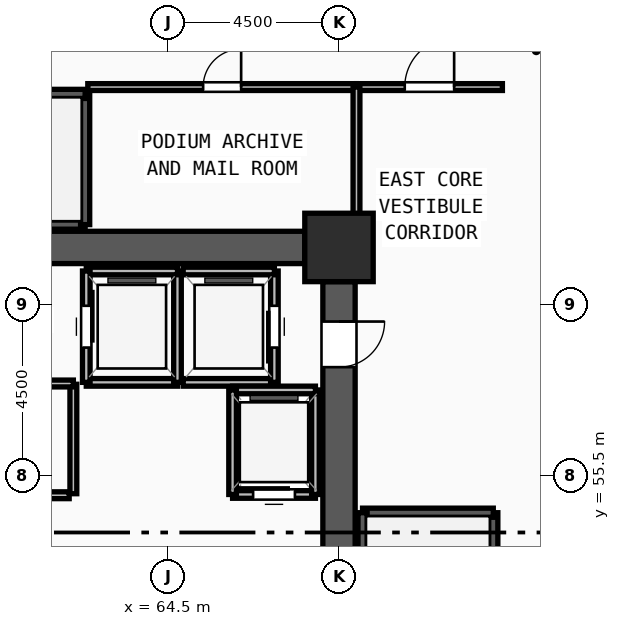
"""IFC4 building model, lengths in metres.
Left out: names, types, materials, properties, quantities, classifications, styles, units other than length and angle.
Written with IfcOpenShell. Run it as: python <this file> out.ifc"""

import sys

from ifc_helpers import new_model, si_unit, direction, frame, frame_2d, origin, origin_2d, place, context, subcontext, project, spatial, rectangle, extrude, source, transform, mapped, element, fill, save


model = new_model("IFC4")
c1 = context("Model", 3, precision=1e-05, world=origin(), true_north=direction((0.0, 1.0)))
c2 = subcontext(c1, "Body", "Model", "MODEL_VIEW")
j1 = project(units=[si_unit("LENGTHUNIT", "METRE"), si_unit("PLANEANGLEUNIT", "RADIAN")], contexts=[c1])
p1 = place(None, origin())
s1 = spatial("IfcSite", under=j1, at=p1, CompositionType="ELEMENT")
p2 = place(p1, origin())
s2 = spatial("IfcBuilding", under=s1, at=p2, CompositionType="ELEMENT")
p3 = place(p2, origin())
s3 = spatial("IfcBuildingStorey", under=s2, at=p3, CompositionType="ELEMENT", Elevation=0.0)
m1 = source(origin(), c2, "Body", "SweptSolid", [
    extrude(rectangle(XDim=1.8, YDim=1.8, at=origin_2d()), origin(), (0.0, 0.0, 1.0), 5.4),
])
p4 = place(p3, frame((69.0, 61.5, 0.0), z_axis=(0.0, 0.0, 1.0), x_axis=(1.0, 0.0, 0.0)))
e1 = element("IfcColumn", 1, at=p4, inside=s3, PredefinedType="COLUMN", context=c2, shape_type="MappedRepresentation", body=[
    mapped(m1, transform((0.0, 0.0, 0.0), x_axis=(1.0, 0.0, 0.0), y_axis=(0.0, 1.0, 0.0), z_axis=(0.0, 0.0, 1.0), scale=1.0)),
])
p5 = place(p3, frame((60.9, 61.5, 0.0), z_axis=(0.0, 0.0, 1.0), x_axis=(1.0, 0.0, 0.0)))
e2 = element("IfcWall", 2, at=p5, inside=s3, PredefinedType="SHEAR", context=c2, shape_type="SweptSolid", body=[
    extrude(rectangle(XDim=7.2, YDim=0.85, at=frame_2d((3.6, 0.0))), origin(), (0.0, 0.0, 1.0), 5.15),
])
p6 = place(p3, frame((69.0, 60.6, 0.0), z_axis=(0.0, 0.0, 1.0), x_axis=(0.0, -1.0, 0.0)))
e3 = element("IfcWall", 3, at=p6, inside=s3, PredefinedType="SHEAR", context=c2, shape_type="SweptSolid", body=[
    extrude(rectangle(XDim=13.2, YDim=0.85, at=frame_2d((6.6, 0.0))), origin(), (0.0, 0.0, 1.0), 5.15),
])
m2 = source(origin(), c2, "Body", "SweptSolid", [
    extrude(rectangle(XDim=1.2, YDim=2.2, at=frame_2d((0.6, 1.1))), frame((0.0, 0.435, 0.0), z_axis=(0.0, -1.0, 0.0), x_axis=(1.0, 0.0, 0.0)), (0.0, 0.0, 1.0), 0.87),
])
p7 = place(p6, frame((1.05, 0.0, 0.0)))
e4 = element("IfcOpeningElement", 4, at=p7, cuts=e3, PredefinedType="OPENING", context=c2, shape_type="MappedRepresentation", body=[
    mapped(m2, transform((0.0, 0.0, 0.0), x_axis=(1.0, 0.0, 0.0), y_axis=(0.0, 1.0, 0.0), z_axis=(0.0, 0.0, 1.0), scale=1.0)),
])
p8 = place(p3, frame((73.06, 46.7, 0.0), z_axis=(0.0, 0.0, 1.0), x_axis=(0.0, 1.0, 0.0)))
e5 = element("IfcWall", 5, at=p8, inside=s3, PredefinedType="SOLIDWALL", context=c2, shape_type="SweptSolid", body=[
    extrude(rectangle(XDim=7.82, YDim=0.24, at=frame_2d((3.91, 0.0))), origin(), (0.0, 0.0, 1.0), 5.15),
])
m3 = source(origin(), c2, "Body", "SweptSolid", [
    extrude(rectangle(XDim=1.2, YDim=2.2, at=frame_2d((0.6, 1.1))), frame((0.0, 0.13, 0.0), z_axis=(0.0, -1.0, 0.0), x_axis=(1.0, 0.0, 0.0)), (0.0, 0.0, 1.0), 0.26),
])
p9 = place(p8, frame((0.32, 0.0, 0.0)))
e6 = element("IfcOpeningElement", 6, at=p9, cuts=e5, PredefinedType="OPENING", context=c2, shape_type="MappedRepresentation", body=[
    mapped(m3, transform((0.0, 0.0, 0.0), x_axis=(1.0, 0.0, 0.0), y_axis=(0.0, 1.0, 0.0), z_axis=(0.0, 0.0, 1.0), scale=1.0)),
])
p10 = place(p3, frame((73.06, 54.52, 0.0), z_axis=(0.0, 0.0, 1.0), x_axis=(-1.0, 0.0, 0.0)))
e7 = element("IfcWall", 7, at=p10, inside=s3, PredefinedType="SOLIDWALL", context=c2, shape_type="SweptSolid", body=[
    extrude(rectangle(XDim=3.44, YDim=0.24, at=frame_2d((1.72, 0.0))), origin(), (0.0, 0.0, 1.0), 5.15),
])
for number, where, z_axis, x_axis in (
    (8, (69.62, 54.52, 0.0), (0.0, 0.0, 1.0), (0.0, -1.0, 0.0)),
    (9, (54.5, 62.1, 0.0), (0.0, 0.0, 1.0), (1.0, 0.0, 0.0)),
):
    element("IfcWall", number, at=place(p3, frame(where, z_axis=z_axis, x_axis=x_axis)), inside=s3, PredefinedType="SOLIDWALL", context=c2, shape_type="SweptSolid", body=[
        extrude(rectangle(XDim=7.82, YDim=0.24, at=frame_2d((3.91, 0.0))), origin(), (0.0, 0.0, 1.0), 5.15),
    ])
p11 = place(p3, frame((62.32, 62.1, 0.0), z_axis=(0.0, 0.0, 1.0), x_axis=(0.0, 1.0, 0.0)))
e10 = element("IfcWall", 10, at=p11, inside=s3, PredefinedType="SOLIDWALL", context=c2, shape_type="SweptSolid", body=[
    extrude(rectangle(XDim=3.44, YDim=0.24, at=frame_2d((1.72, 0.0))), origin(), (0.0, 0.0, 1.0), 5.15),
])
p12 = place(p3, frame((62.32, 65.54, 0.0), z_axis=(0.0, 0.0, 1.0), x_axis=(-1.0, 0.0, 0.0)))
e11 = element("IfcWall", 11, at=p12, inside=s3, PredefinedType="SOLIDWALL", context=c2, shape_type="SweptSolid", body=[
    extrude(rectangle(XDim=7.82, YDim=0.24, at=frame_2d((3.91, 0.0))), origin(), (0.0, 0.0, 1.0), 5.15),
])
p13 = place(p12, frame((6.3, 0.0, 0.0)))
e12 = element("IfcOpeningElement", 12, at=p13, cuts=e11, PredefinedType="OPENING", context=c2, shape_type="MappedRepresentation", body=[
    mapped(m3, transform((0.0, 0.0, 0.0), x_axis=(1.0, 0.0, 0.0), y_axis=(0.0, 1.0, 0.0), z_axis=(0.0, 0.0, 1.0), scale=1.0)),
])
p14 = place(p3, frame((62.35, 57.95, 0.0), z_axis=(0.0, 0.0, 1.0), x_axis=(1.0, 0.0, 0.0)))
e13 = element("IfcWall", 13, at=p14, inside=s3, PredefinedType="SOLIDWALL", context=c2, shape_type="SweptSolid", body=[
    extrude(rectangle(XDim=2.4, YDim=0.2, at=frame_2d((1.2, 0.0))), origin(), (0.0, 0.0, 1.0), 5.15),
])
p15 = place(p3, frame((64.75, 57.95, 0.0), z_axis=(0.0, 0.0, 1.0), x_axis=(0.0, 1.0, 0.0)))
e14 = element("IfcWall", 14, at=p15, inside=s3, PredefinedType="SOLIDWALL", context=c2, shape_type="SweptSolid", body=[
    extrude(rectangle(XDim=2.93, YDim=0.2, at=frame_2d((1.465, 0.0))), origin(), (0.0, 0.0, 1.0), 5.15),
])
p16 = place(p3, frame((64.75, 60.88, 0.0), z_axis=(0.0, 0.0, 1.0), x_axis=(-1.0, 0.0, 0.0)))
e15 = element("IfcWall", 15, at=p16, inside=s3, PredefinedType="SOLIDWALL", context=c2, shape_type="SweptSolid", body=[
    extrude(rectangle(XDim=2.4, YDim=0.2, at=frame_2d((1.2, 0.0))), origin(), (0.0, 0.0, 1.0), 5.15),
])
p17 = place(p3, frame((62.35, 60.88, 0.0), z_axis=(0.0, 0.0, 1.0), x_axis=(0.0, -1.0, 0.0)))
e16 = element("IfcWall", 16, at=p17, inside=s3, PredefinedType="SOLIDWALL", context=c2, shape_type="SweptSolid", body=[
    extrude(rectangle(XDim=2.93, YDim=0.2, at=frame_2d((1.465, 0.0))), origin(), (0.0, 0.0, 1.0), 5.15),
])
m4 = source(origin(), c2, "Body", "SweptSolid", [
    extrude(rectangle(XDim=1.1, YDim=2.2, at=frame_2d((0.55, 1.1))), frame((0.0, 0.11, 0.0), z_axis=(0.0, -1.0, 0.0), x_axis=(1.0, 0.0, 0.0)), (0.0, 0.0, 1.0), 0.22),
])
p18 = place(p17, frame((0.915, 0.0, 0.0)))
e17 = element("IfcOpeningElement", 17, at=p18, cuts=e16, PredefinedType="OPENING", context=c2, shape_type="MappedRepresentation", body=[
    mapped(m4, transform((0.0, 0.0, 0.0), x_axis=(1.0, 0.0, 0.0), y_axis=(0.0, 1.0, 0.0), z_axis=(0.0, 0.0, 1.0), scale=1.0)),
])
p19 = place(p3, frame((64.9, 57.95, 0.0), z_axis=(0.0, 0.0, 1.0), x_axis=(1.0, 0.0, 0.0)))
e18 = element("IfcWall", 18, at=p19, inside=s3, PredefinedType="SOLIDWALL", context=c2, shape_type="SweptSolid", body=[
    extrude(rectangle(XDim=2.4, YDim=0.2, at=frame_2d((1.2, 0.0))), origin(), (0.0, 0.0, 1.0), 5.15),
])
p20 = place(p3, frame((67.3, 57.95, 0.0), z_axis=(0.0, 0.0, 1.0), x_axis=(0.0, 1.0, 0.0)))
e19 = element("IfcWall", 19, at=p20, inside=s3, PredefinedType="SOLIDWALL", context=c2, shape_type="SweptSolid", body=[
    extrude(rectangle(XDim=2.93, YDim=0.2, at=frame_2d((1.465, 0.0))), origin(), (0.0, 0.0, 1.0), 5.15),
])
p21 = place(p20, frame((0.915, 0.0, 0.0)))
e20 = element("IfcOpeningElement", 20, at=p21, cuts=e19, PredefinedType="OPENING", context=c2, shape_type="MappedRepresentation", body=[
    mapped(m4, transform((0.0, 0.0, 0.0), x_axis=(1.0, 0.0, 0.0), y_axis=(0.0, 1.0, 0.0), z_axis=(0.0, 0.0, 1.0), scale=1.0)),
])
p22 = place(p3, frame((67.3, 60.88, 0.0), z_axis=(0.0, 0.0, 1.0), x_axis=(-1.0, 0.0, 0.0)))
e21 = element("IfcWall", 21, at=p22, inside=s3, PredefinedType="SOLIDWALL", context=c2, shape_type="SweptSolid", body=[
    extrude(rectangle(XDim=2.4, YDim=0.2, at=frame_2d((1.2, 0.0))), origin(), (0.0, 0.0, 1.0), 5.15),
])
p23 = place(p3, frame((66.2, 55.0, 0.0), z_axis=(0.0, 0.0, 1.0), x_axis=(1.0, 0.0, 0.0)))
e22 = element("IfcWall", 22, at=p23, inside=s3, PredefinedType="SOLIDWALL", context=c2, shape_type="SweptSolid", body=[
    extrude(rectangle(XDim=2.18, YDim=0.2, at=frame_2d((1.09, 0.0))), origin(), (0.0, 0.0, 1.0), 5.15),
])
p24 = place(p23, frame((0.54, 0.0, 0.0)))
e23 = element("IfcOpeningElement", 23, at=p24, cuts=e22, PredefinedType="OPENING", context=c2, shape_type="MappedRepresentation", body=[
    mapped(m4, transform((0.0, 0.0, 0.0), x_axis=(1.0, 0.0, 0.0), y_axis=(0.0, 1.0, 0.0), z_axis=(0.0, 0.0, 1.0), scale=1.0)),
])
p25 = place(p3, frame((68.38, 55.0, 0.0), z_axis=(0.0, 0.0, 1.0), x_axis=(0.0, 1.0, 0.0)))
e24 = element("IfcWall", 24, at=p25, inside=s3, PredefinedType="SOLIDWALL", context=c2, shape_type="SweptSolid", body=[
    extrude(rectangle(XDim=2.75, YDim=0.2, at=frame_2d((1.375, 0.0))), origin(), (0.0, 0.0, 1.0), 5.15),
])
p26 = place(p3, frame((68.38, 57.75, 0.0), z_axis=(0.0, 0.0, 1.0), x_axis=(-1.0, 0.0, 0.0)))
e25 = element("IfcWall", 25, at=p26, inside=s3, PredefinedType="SOLIDWALL", context=c2, shape_type="SweptSolid", body=[
    extrude(rectangle(XDim=2.18, YDim=0.2, at=frame_2d((1.09, 0.0))), origin(), (0.0, 0.0, 1.0), 5.15),
])
p27 = place(p3, frame((66.2, 57.75, 0.0), z_axis=(0.0, 0.0, 1.0), x_axis=(0.0, -1.0, 0.0)))
e26 = element("IfcWall", 26, at=p27, inside=s3, PredefinedType="SOLIDWALL", context=c2, shape_type="SweptSolid", body=[
    extrude(rectangle(XDim=2.75, YDim=0.2, at=frame_2d((1.375, 0.0))), origin(), (0.0, 0.0, 1.0), 5.15),
])
p28 = place(p3, frame((59.84, 54.98, 0.0), z_axis=(0.0, 0.0, 1.0), x_axis=(1.0, 0.0, 0.0)))
e27 = element("IfcWall", 27, at=p28, inside=s3, PredefinedType="PARTITIONING", context=c2, shape_type="SweptSolid", body=[
    extrude(rectangle(XDim=2.06, YDim=0.18, at=frame_2d((1.03, 0.0))), origin(), (0.0, 0.0, 1.0), 5.15),
])
m5 = source(origin(), c2, "Body", "SweptSolid", [
    extrude(rectangle(XDim=0.85, YDim=2.1, at=frame_2d((0.425, 1.05))), frame((0.0, 0.1, 0.0), z_axis=(0.0, -1.0, 0.0), x_axis=(1.0, 0.0, 0.0)), (0.0, 0.0, 1.0), 0.2),
])
p29 = place(p28, frame((0.605, 0.0, 0.0)))
e28 = element("IfcOpeningElement", 28, at=p29, cuts=e27, PredefinedType="OPENING", context=c2, shape_type="MappedRepresentation", body=[
    mapped(m5, transform((0.0, 0.0, 0.0), x_axis=(1.0, 0.0, 0.0), y_axis=(0.0, 1.0, 0.0), z_axis=(0.0, 0.0, 1.0), scale=1.0)),
])
p30 = place(p3, frame((62.39, 65.72, 0.0), z_axis=(0.0, 0.0, 1.0), x_axis=(1.0, 0.0, 0.0)))
e29 = element("IfcWall", 29, at=p30, inside=s3, PredefinedType="PARTITIONING", context=c2, shape_type="SweptSolid", body=[
    extrude(rectangle(XDim=7.07, YDim=0.18, at=frame_2d((3.535, 0.0))), origin(), (0.0, 0.0, 1.0), 5.15),
])
m6 = source(origin(), c2, "Body", "SweptSolid", [
    extrude(rectangle(XDim=1.0, YDim=2.2, at=frame_2d((0.5, 1.1))), frame((0.0, 0.1, 0.0), z_axis=(0.0, -1.0, 0.0), x_axis=(1.0, 0.0, 0.0)), (0.0, 0.0, 1.0), 0.2),
])
p31 = place(p30, frame((3.035, 0.0, 0.0)))
e30 = element("IfcOpeningElement", 30, at=p31, cuts=e29, PredefinedType="OPENING", context=c2, shape_type="MappedRepresentation", body=[
    mapped(m6, transform((0.0, 0.0, 0.0), x_axis=(1.0, 0.0, 0.0), y_axis=(0.0, 1.0, 0.0), z_axis=(0.0, 0.0, 1.0), scale=1.0)),
])
p32 = place(p3, frame((69.46, 65.72, 0.0), z_axis=(0.0, 0.0, 1.0), x_axis=(1.0, 0.0, 0.0)))
e31 = element("IfcWall", 31, at=p32, inside=s3, PredefinedType="PARTITIONING", context=c2, shape_type="SweptSolid", body=[
    extrude(rectangle(XDim=3.84, YDim=0.18, at=frame_2d((1.92, 0.0))), origin(), (0.0, 0.0, 1.0), 5.15),
])
m7 = source(origin(), c2, "Body", "SweptSolid", [
    extrude(rectangle(XDim=1.3, YDim=2.2, at=frame_2d((0.65, 1.1))), frame((0.0, 0.1, 0.0), z_axis=(0.0, -1.0, 0.0), x_axis=(1.0, 0.0, 0.0)), (0.0, 0.0, 1.0), 0.2),
])
p33 = place(p32, frame((1.27, 0.0, 0.0)))
e32 = element("IfcOpeningElement", 32, at=p33, cuts=e31, PredefinedType="OPENING", context=c2, shape_type="MappedRepresentation", body=[
    mapped(m7, transform((0.0, 0.0, 0.0), x_axis=(1.0, 0.0, 0.0), y_axis=(0.0, 1.0, 0.0), z_axis=(0.0, 0.0, 1.0), scale=1.0)),
])
p34 = place(p3, frame((62.01, 55.02, 0.0), z_axis=(0.0, 0.0, 1.0), x_axis=(0.0, 1.0, 0.0)))
e33 = element("IfcWall", 33, at=p34, inside=s3, PredefinedType="PARTITIONING", context=c2, shape_type="SweptSolid", body=[
    extrude(rectangle(XDim=2.88, YDim=0.18, at=frame_2d((1.44, 0.0))), origin(), (0.0, 0.0, 1.0), 5.15),
])
p35 = place(p3, frame((59.72, 57.92, 0.0), z_axis=(0.0, 0.0, 1.0), x_axis=(1.0, 0.0, 0.0)))
e34 = element("IfcWall", 34, at=p35, inside=s3, PredefinedType="PARTITIONING", context=c2, shape_type="SweptSolid", body=[
    extrude(rectangle(XDim=2.29, YDim=0.18, at=frame_2d((1.145, 0.0))), origin(), (0.0, 0.0, 1.0), 5.15),
])
p36 = place(p3, frame((69.46, 61.95, 0.0), z_axis=(0.0, 0.0, 1.0), x_axis=(0.0, 1.0, 0.0)))
e35 = element("IfcWall", 35, at=p36, inside=s3, PredefinedType="PARTITIONING", context=c2, shape_type="SweptSolid", body=[
    extrude(rectangle(XDim=3.77, YDim=0.18, at=frame_2d((1.885, 0.0))), origin(), (0.0, 0.0, 1.0), 5.15),
])
m8 = source(origin(), c2, "Body", "SweptSolid", [
    extrude(rectangle(XDim=1.2, YDim=2.2, at=frame_2d((0.6, 1.1))), frame((0.0, 0.025, 0.0), z_axis=(0.0, -1.0, 0.0), x_axis=(1.0, 0.0, 0.0)), (0.0, 0.0, 1.0), 0.05),
])
p37 = place(p7, origin())
e36 = element("IfcDoor", 36, at=p37, inside=s3, OperationType="SINGLE_SWING_LEFT", PredefinedType="DOOR", context=c2, shape_type="MappedRepresentation", body=[
    mapped(m8, transform((0.0, 0.0, 0.0), x_axis=(1.0, 0.0, 0.0), y_axis=(0.0, 1.0, 0.0), z_axis=(0.0, 0.0, 1.0), scale=1.0)),
])
fill(e4, e36)
m9 = source(origin(), c2, "Body", "SweptSolid", [
    extrude(rectangle(XDim=1.1, YDim=2.2, at=frame_2d((0.55, 1.1))), frame((0.0, 0.025, 0.0), z_axis=(0.0, -1.0, 0.0), x_axis=(1.0, 0.0, 0.0)), (0.0, 0.0, 1.0), 0.05),
])
p38 = place(p18, origin())
e37 = element("IfcDoor", 37, at=p38, inside=s3, OperationType="SLIDING_TO_LEFT", PredefinedType="DOOR", context=c2, shape_type="MappedRepresentation", body=[
    mapped(m9, transform((0.0, 0.0, 0.0), x_axis=(1.0, 0.0, 0.0), y_axis=(0.0, 1.0, 0.0), z_axis=(0.0, 0.0, 1.0), scale=1.0)),
])
fill(e17, e37)
p39 = place(p21, origin())
e38 = element("IfcDoor", 38, at=p39, inside=s3, OperationType="SLIDING_TO_LEFT", PredefinedType="DOOR", context=c2, shape_type="MappedRepresentation", body=[
    mapped(m9, transform((0.0, 0.0, 0.0), x_axis=(1.0, 0.0, 0.0), y_axis=(0.0, 1.0, 0.0), z_axis=(0.0, 0.0, 1.0), scale=1.0)),
])
fill(e20, e38)
p40 = place(p24, origin())
e39 = element("IfcDoor", 39, at=p40, inside=s3, OperationType="SLIDING_TO_LEFT", PredefinedType="DOOR", context=c2, shape_type="MappedRepresentation", body=[
    mapped(m9, transform((0.0, 0.0, 0.0), x_axis=(1.0, 0.0, 0.0), y_axis=(0.0, 1.0, 0.0), z_axis=(0.0, 0.0, 1.0), scale=1.0)),
])
fill(e23, e39)
m10 = source(origin(), c2, "Body", "SweptSolid", [
    extrude(rectangle(XDim=1.0, YDim=2.2, at=frame_2d((0.5, 1.1))), frame((0.0, 0.025, 0.0), z_axis=(0.0, -1.0, 0.0), x_axis=(1.0, 0.0, 0.0)), (0.0, 0.0, 1.0), 0.05),
])
p41 = place(p31, origin())
e40 = element("IfcDoor", 40, at=p41, inside=s3, OperationType="SINGLE_SWING_RIGHT", PredefinedType="DOOR", context=c2, shape_type="MappedRepresentation", body=[
    mapped(m10, transform((0.0, 0.0, 0.0), x_axis=(1.0, 0.0, 0.0), y_axis=(0.0, 1.0, 0.0), z_axis=(0.0, 0.0, 1.0), scale=1.0)),
])
fill(e30, e40)
m11 = source(origin(), c2, "Body", "SweptSolid", [
    extrude(rectangle(XDim=1.3, YDim=2.2, at=frame_2d((0.65, 1.1))), frame((0.0, 0.025, 0.0), z_axis=(0.0, -1.0, 0.0), x_axis=(1.0, 0.0, 0.0)), (0.0, 0.0, 1.0), 0.05),
])
p42 = place(p33, origin())
e41 = element("IfcDoor", 41, at=p42, inside=s3, OperationType="SINGLE_SWING_RIGHT", PredefinedType="DOOR", context=c2, shape_type="MappedRepresentation", body=[
    mapped(m11, transform((0.0, 0.0, 0.0), x_axis=(1.0, 0.0, 0.0), y_axis=(0.0, 1.0, 0.0), z_axis=(0.0, 0.0, 1.0), scale=1.0)),
])
fill(e32, e41)
save(model, sys.argv[1])
